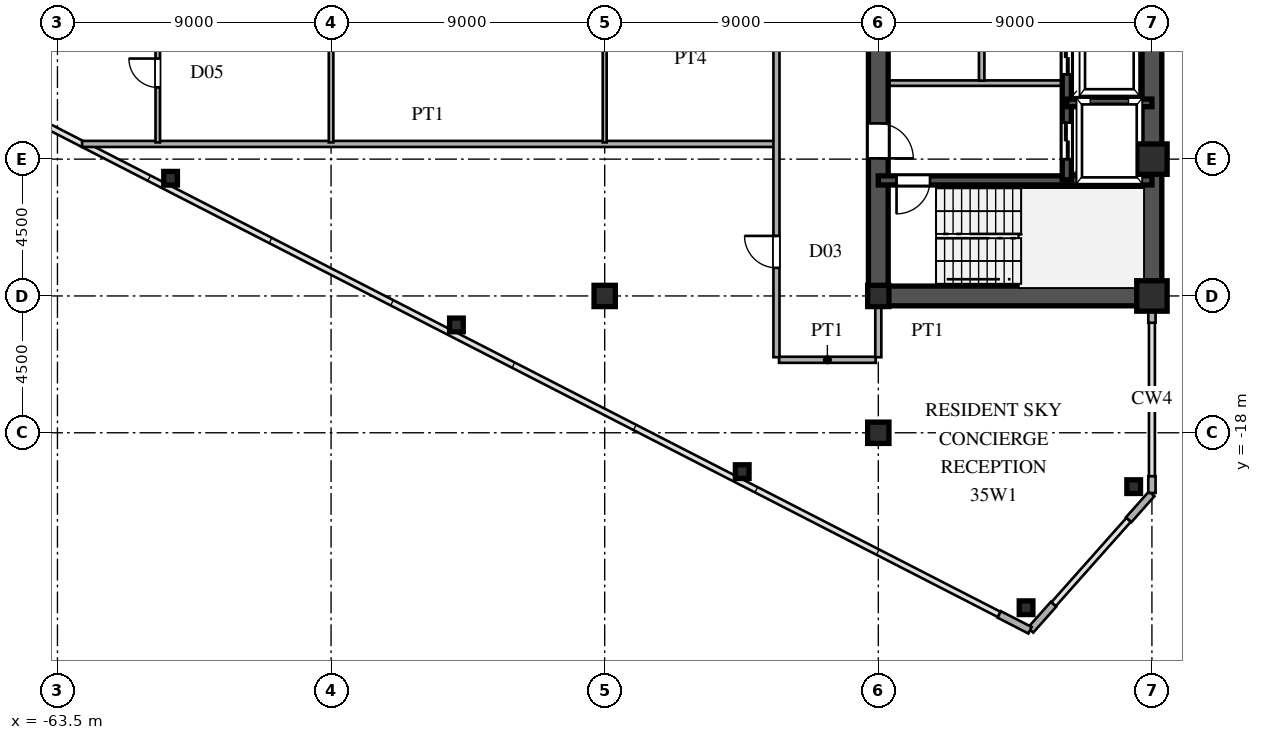
"""IFC4 building model, lengths in metres.
Left out: names, types, materials, properties, quantities, classifications, styles, units other than length and angle.
Written with IfcOpenShell. Run it as: python <this file> out.ifc"""

import sys

from ifc_helpers import new_model, si_unit, direction, frame, frame_2d, origin, origin_2d, place, context, subcontext, project, spatial, rectangle, hollow_rectangle, i_section, extrude, source, transform, mapped, element, fill, save


model = new_model("IFC4")
c1 = context("Model", 3, precision=1e-05, world=origin(), true_north=direction((0.0, 1.0)))
c2 = subcontext(c1, "Body", "Model", "MODEL_VIEW")
j1 = project(units=[si_unit("LENGTHUNIT", "METRE"), si_unit("PLANEANGLEUNIT", "RADIAN")], contexts=[c1])
p1 = place(None, origin())
s1 = spatial("IfcSite", under=j1, at=p1, CompositionType="ELEMENT")
p2 = place(p1, origin())
s2 = spatial("IfcBuilding", under=s1, at=p2, CompositionType="ELEMENT")
p3 = place(p2, frame((0.0, 0.0, 132.0)))
s3 = spatial("IfcBuildingStorey", under=s2, at=p3, CompositionType="ELEMENT", Elevation=132.0)
m1 = source(origin(), c2, "Body", "SweptSolid", [
    extrude(hollow_rectangle(XDim=1.0, YDim=1.0, WallThickness=0.042, at=origin_2d()), origin(), (0.0, 0.0, 1.0), 3.6),
])
for number, where, z_axis, x_axis in (
    (1, (-27.5, -13.5, 0.0), (0.0, 0.0, 1.0), (1.0, 0.0, 0.0)),
    (2, (-27.5, -9.0, 0.0), (0.0, 0.0, 1.0), (1.0, 0.0, 0.0)),
):
    element("IfcColumn", number, at=place(p3, frame(where, z_axis=z_axis, x_axis=x_axis)), inside=s3, PredefinedType="COLUMN", context=c2, shape_type="MappedRepresentation", body=[
        mapped(m1, transform((0.0, 0.0, 0.0), scale=1.0)),
    ])
m2 = source(origin(), c2, "Body", "SweptSolid", [
    extrude(i_section(OverallWidth=0.7, OverallDepth=0.7, WebThickness=0.028, FlangeThickness=0.045, at=origin_2d()), origin(), (0.0, 0.0, 1.0), 3.6),
])
for number, where, z_axis, x_axis in (
    (3, (-36.5, -18.0, 0.0), (0.0, 0.0, 1.0), (1.0, 0.0, 0.0)),
    (4, (-36.5, -13.5, 0.0), (0.0, 0.0, 1.0), (1.0, 0.0, 0.0)),
    (5, (-45.5, -13.5, 0.0), (0.0, 0.0, 1.0), (1.0, 0.0, 0.0)),
):
    element("IfcColumn", number, at=place(p3, frame(where, z_axis=z_axis, x_axis=x_axis)), inside=s3, PredefinedType="COLUMN", context=c2, shape_type="MappedRepresentation", body=[
        mapped(m2, transform((0.0, 0.0, 0.0), scale=1.0)),
    ])
m3 = source(origin(), c2, "Body", "SweptSolid", [
    extrude(hollow_rectangle(XDim=0.45, YDim=0.45, WallThickness=0.018, at=origin_2d()), origin(), (0.0, 0.0, 1.0), 3.6),
])
for number, where, z_axis, x_axis in (
    (6, (-28.1, -19.772, 0.0), (0.0, 0.0, 1.0), (1.0, 0.0, 0.0)),
    (7, (-31.64, -23.754, 0.0), (0.0, 0.0, 1.0), (1.0, 0.0, 0.0)),
    (8, (-40.976, -19.278, 0.0), (0.0, 0.0, 1.0), (1.0, 0.0, 0.0)),
    (9, (-50.377, -14.453, 0.0), (0.0, 0.0, 1.0), (1.0, 0.0, 0.0)),
    (10, (-59.779, -9.629, 0.0), (0.0, 0.0, 1.0), (1.0, 0.0, 0.0)),
):
    element("IfcColumn", number, at=place(p3, frame(where, z_axis=z_axis, x_axis=x_axis)), inside=s3, PredefinedType="COLUMN", context=c2, shape_type="MappedRepresentation", body=[
        mapped(m3, transform((0.0, 0.0, 0.0), scale=1.0)),
    ])
p4 = place(p3, frame((-27.5, -19.98, 0.0), z_axis=(0.0, 0.0, 1.0), x_axis=(0.0, 1.0, 0.0)))
e11 = element("IfcWall", 11, at=p4, inside=s3, PredefinedType="SOLIDWALL", context=c2, shape_type="SweptSolid", body=[
    extrude(rectangle(XDim=0.55, YDim=0.24, at=frame_2d((0.275, 0.0))), origin(), (0.0, 0.0, 1.0), 3.34),
])
p5 = place(p3, frame((-27.5, -14.38, 0.0), z_axis=(0.0, 0.0, 1.0), x_axis=(0.0, 1.0, 0.0)))
e12 = element("IfcWall", 12, at=p5, inside=s3, PredefinedType="SOLIDWALL", context=c2, shape_type="SweptSolid", body=[
    extrude(rectangle(XDim=0.55, YDim=0.24, at=frame_2d((0.275, 0.0))), origin(), (0.0, 0.0, 1.0), 2.79),
])
p6 = place(p3, frame((-32.523, -23.975, 0.0), z_axis=(0.0, 0.0, 1.0), x_axis=(0.889797395748, -0.456355776255, 0.0)))
e13 = element("IfcWall", 13, at=p6, inside=s3, PredefinedType="SOLIDWALL", context=c2, shape_type="SweptSolid", body=[
    extrude(rectangle(XDim=1.14, YDim=0.24, at=frame_2d((0.57, 0.0))), origin(), (0.0, 0.0, 1.0), 3.34),
])
for number, where, z_axis, x_axis in (
    (14, (-31.493, -24.492, 0.0), (0.0, 0.0, 1.0), (0.664, 0.747, 0.0)),
    (15, (-28.264, -20.86, 0.0), (0.0, 0.0, 1.0), (0.664, 0.747, 0.0)),
):
    element("IfcWall", number, at=place(p3, frame(where, z_axis=z_axis, x_axis=x_axis)), inside=s3, PredefinedType="SOLIDWALL", context=c2, shape_type="SweptSolid", body=[
        extrude(rectangle(XDim=1.14, YDim=0.24, at=frame_2d((0.57, 0.0))), origin(), (0.0, 0.0, 1.0), 3.34),
    ])
p7 = place(p3, frame((-27.5, -13.5, 0.0), z_axis=(0.0, 0.0, 1.0), x_axis=(0.0, 1.0, 0.0)))
e16 = element("IfcWall", 16, at=p7, inside=s3, PredefinedType="SHEAR", context=c2, shape_type="SweptSolid", body=[
    extrude(rectangle(XDim=12.2, YDim=0.65, at=frame_2d((6.1, 0.0))), origin(), (0.0, 0.0, 1.0), 3.34),
])
p8 = place(p3, frame((-36.5, -13.5, 0.0), z_axis=(0.0, 0.0, 1.0), x_axis=(1.0, 0.0, 0.0)))
e17 = element("IfcWall", 17, at=p8, inside=s3, PredefinedType="SHEAR", context=c2, shape_type="SweptSolid", body=[
    extrude(rectangle(XDim=9.0, YDim=0.65, at=frame_2d((4.5, 0.0))), origin(), (0.0, 0.0, 1.0), 3.34),
])
p9 = place(p3, frame((-36.5, -13.65, 0.0), z_axis=(0.0, 0.0, 1.0), x_axis=(0.0, 1.0, 0.0)))
e18 = element("IfcWall", 18, at=p9, inside=s3, PredefinedType="SHEAR", context=c2, shape_type="SweptSolid", body=[
    extrude(rectangle(XDim=7.15, YDim=0.65, at=frame_2d((3.575, 0.0))), origin(), (0.0, 0.0, 1.0), 3.34),
])
p10 = place(p9, frame((4.675, 0.0, 0.0)))
e19 = element("IfcOpeningElement", 19, at=p10, cuts=e18, PredefinedType="OPENING", context=c2, shape_type="SweptSolid", body=[
    extrude(rectangle(XDim=1.15, YDim=2.2, at=frame_2d((0.575, 1.1))), frame((0.0, 0.335, 0.0), z_axis=(0.0, -1.0, 0.0), x_axis=(1.0, 0.0, 0.0)), (0.0, 0.0, 1.0), 0.67),
])
p11 = place(p3, frame((-36.5, -6.5, 0.0), z_axis=(0.0, 0.0, 1.0), x_axis=(0.0, 1.0, 0.0)))
e20 = element("IfcWall", 20, at=p11, inside=s3, PredefinedType="SHEAR", context=c2, shape_type="SweptSolid", body=[
    extrude(rectangle(XDim=5.2, YDim=0.65, at=frame_2d((2.6, 0.0))), origin(), (0.0, 0.0, 1.0), 3.34),
])
p12 = place(p11, frame((2.125, 0.0, 0.0)))
e21 = element("IfcOpeningElement", 21, at=p12, cuts=e20, PredefinedType="OPENING", context=c2, shape_type="SweptSolid", body=[
    extrude(rectangle(XDim=0.95, YDim=2.15, at=frame_2d((0.475, 1.075))), frame((0.0, 0.335, 0.0), z_axis=(0.0, -1.0, 0.0), x_axis=(1.0, 0.0, 0.0)), (0.0, 0.0, 1.0), 0.67),
])
p13 = place(p3, frame((-36.5, -9.7, 0.0), z_axis=(0.0, 0.0, 1.0), x_axis=(1.0, 0.0, 0.0)))
e22 = element("IfcWall", 22, at=p13, inside=s3, PredefinedType="SHEAR", context=c2, shape_type="SweptSolid", body=[
    extrude(rectangle(XDim=9.0, YDim=0.3, at=frame_2d((4.5, 0.0))), origin(), (0.0, 0.0, 1.0), 3.34),
])
p14 = place(p13, frame((0.6, 0.0, 0.0)))
e23 = element("IfcOpeningElement", 23, at=p14, cuts=e22, PredefinedType="OPENING", context=c2, shape_type="SweptSolid", body=[
    extrude(rectangle(XDim=1.1, YDim=2.2, at=frame_2d((0.55, 1.1))), frame((0.0, 0.16, 0.0), z_axis=(0.0, -1.0, 0.0), x_axis=(1.0, 0.0, 0.0)), (0.0, 0.0, 1.0), 0.32),
])
p15 = place(p3, frame((-30.3, -7.15, 0.0), z_axis=(0.0, 0.0, 1.0), x_axis=(1.0, 0.0, 0.0)))
e24 = element("IfcWall", 24, at=p15, inside=s3, PredefinedType="SHEAR", context=c2, shape_type="SweptSolid", body=[
    extrude(rectangle(XDim=2.8, YDim=0.25, at=frame_2d((1.4, 0.0))), origin(), (0.0, 0.0, 1.0), 3.34),
])
p16 = place(p3, frame((-30.3, -9.68, 0.0), z_axis=(0.0, 0.0, 1.0), x_axis=(0.0, 1.0, 0.0)))
e25 = element("IfcWall", 25, at=p16, inside=s3, PredefinedType="SHEAR", context=c2, shape_type="SweptSolid", body=[
    extrude(rectangle(XDim=2.56, YDim=0.3, at=frame_2d((1.28, 0.0))), origin(), (0.0, 0.0, 1.0), 3.34),
])
p17 = place(p16, frame((0.68, 0.0, 0.0)))
e26 = element("IfcOpeningElement", 26, at=p17, cuts=e25, PredefinedType="OPENING", context=c2, shape_type="SweptSolid", body=[
    extrude(rectangle(XDim=1.2, YDim=2.25, at=frame_2d((0.6, 1.125))), frame((0.0, 0.16, 0.0), z_axis=(0.0, -1.0, 0.0), x_axis=(1.0, 0.0, 0.0)), (0.0, 0.0, 1.0), 0.32),
])
p18 = place(p3, frame((-30.3, -7.12, 0.0), z_axis=(0.0, 0.0, 1.0), x_axis=(0.0, 1.0, 0.0)))
e27 = element("IfcWall", 27, at=p18, inside=s3, PredefinedType="SHEAR", context=c2, shape_type="SweptSolid", body=[
    extrude(rectangle(XDim=2.92, YDim=0.3, at=frame_2d((1.46, 0.0))), origin(), (0.0, 0.0, 1.0), 3.34),
])
p19 = place(p18, frame((0.91, 0.0, 0.0)))
e28 = element("IfcOpeningElement", 28, at=p19, cuts=e27, PredefinedType="OPENING", context=c2, shape_type="SweptSolid", body=[
    extrude(rectangle(XDim=1.1, YDim=2.2, at=frame_2d((0.55, 1.1))), frame((0.0, 0.16, 0.0), z_axis=(0.0, -1.0, 0.0), x_axis=(1.0, 0.0, 0.0)), (0.0, 0.0, 1.0), 0.32),
])
p20 = place(p3, frame((-36.15, -6.5, 0.0), z_axis=(0.0, 0.0, 1.0), x_axis=(1.0, 0.0, 0.0)))
e29 = element("IfcWall", 29, at=p20, inside=s3, PredefinedType="PARTITIONING", context=c2, shape_type="SweptSolid", body=[
    extrude(rectangle(XDim=5.7, YDim=0.18, at=frame_2d((2.85, 0.0))), origin(), (0.0, 0.0, 1.0), 3.34),
])
p21 = place(p3, frame((-33.1, -6.42, 0.0), z_axis=(0.0, 0.0, 1.0), x_axis=(0.0, 1.0, 0.0)))
e30 = element("IfcWall", 30, at=p21, inside=s3, PredefinedType="PARTITIONING", context=c2, shape_type="SweptSolid", body=[
    extrude(rectangle(XDim=5.04, YDim=0.18, at=frame_2d((2.52, 0.0))), origin(), (0.0, 0.0, 1.0), 3.34),
])
p22 = place(p3, frame((-39.765, -15.6, 0.0), z_axis=(0.0, 0.0, 1.0), x_axis=(1.0, 0.0, 0.0)))
e31 = element("IfcWall", 31, at=p22, inside=s3, PredefinedType="PARTITIONING", context=c2, shape_type="SweptSolid", body=[
    extrude(rectangle(XDim=3.18, YDim=0.2, at=frame_2d((1.59, 0.0))), origin(), (0.0, 0.0, 1.0), 3.34),
])
p23 = place(p3, frame((-62.69, -8.5, 0.0), z_axis=(0.0, 0.0, 1.0), x_axis=(1.0, 0.0, 0.0)))
e32 = element("IfcWall", 32, at=p23, inside=s3, PredefinedType="PARTITIONING", context=c2, shape_type="SweptSolid", body=[
    extrude(rectangle(XDim=22.76, YDim=0.2, at=frame_2d((11.38, 0.0))), origin(), (0.0, 0.0, 1.0), 3.34),
])
p24 = place(p3, frame((-60.2, -8.45, 0.0), z_axis=(0.0, 0.0, 1.0), x_axis=(0.0, 1.0, 0.0)))
e33 = element("IfcWall", 33, at=p24, inside=s3, PredefinedType="PARTITIONING", context=c2, shape_type="SweptSolid", body=[
    extrude(rectangle(XDim=13.9, YDim=0.15, at=frame_2d((6.95, 0.0))), origin(), (0.0, 0.0, 1.0), 3.34),
])
p25 = place(p24, frame((1.808, 0.0, 0.0)))
e34 = element("IfcOpeningElement", 34, at=p25, cuts=e33, PredefinedType="OPENING", context=c2, shape_type="SweptSolid", body=[
    extrude(rectangle(XDim=0.95, YDim=2.15, at=frame_2d((0.475, 1.075))), frame((0.0, 0.085, 0.0), z_axis=(0.0, -1.0, 0.0), x_axis=(1.0, 0.0, 0.0)), (0.0, 0.0, 1.0), 0.17),
])
p26 = place(p24, frame((6.475, 0.0, 0.0)))
e35 = element("IfcOpeningElement", 35, at=p26, cuts=e33, PredefinedType="OPENING", context=c2, shape_type="SweptSolid", body=[
    extrude(rectangle(XDim=0.95, YDim=2.15, at=frame_2d((0.475, 1.075))), frame((0.0, 0.085, 0.0), z_axis=(0.0, -1.0, 0.0), x_axis=(1.0, 0.0, 0.0)), (0.0, 0.0, 1.0), 0.17),
])
p27 = place(p24, frame((11.142, 0.0, 0.0)))
e36 = element("IfcOpeningElement", 36, at=p27, cuts=e33, PredefinedType="OPENING", context=c2, shape_type="SweptSolid", body=[
    extrude(rectangle(XDim=0.95, YDim=2.15, at=frame_2d((0.475, 1.075))), frame((0.0, 0.085, 0.0), z_axis=(0.0, -1.0, 0.0), x_axis=(1.0, 0.0, 0.0)), (0.0, 0.0, 1.0), 0.17),
])
p28 = place(p3, frame((-54.5, -8.45, 0.0), z_axis=(0.0, 0.0, 1.0), x_axis=(0.0, 1.0, 0.0)))
e37 = element("IfcWall", 37, at=p28, inside=s3, PredefinedType="PARTITIONING", context=c2, shape_type="SweptSolid", body=[
    extrude(rectangle(XDim=3.93, YDim=0.15, at=frame_2d((1.965, 0.0))), origin(), (0.0, 0.0, 1.0), 3.34),
])
p29 = place(p3, frame((-45.5, -8.45, 0.0), z_axis=(0.0, 0.0, 1.0), x_axis=(0.0, 1.0, 0.0)))
e38 = element("IfcWall", 38, at=p29, inside=s3, PredefinedType="PARTITIONING", context=c2, shape_type="SweptSolid", body=[
    extrude(rectangle(XDim=9.233, YDim=0.13, at=frame_2d((4.616, 0.0))), origin(), (0.0, 0.0, 1.0), 2.44),
])
p30 = place(p29, frame((6.475, 0.0, 0.0)))
e39 = element("IfcOpeningElement", 39, at=p30, cuts=e38, PredefinedType="OPENING", context=c2, shape_type="SweptSolid", body=[
    extrude(rectangle(XDim=0.95, YDim=2.15, at=frame_2d((0.475, 1.075))), frame((0.0, 0.075, 0.0), z_axis=(0.0, -1.0, 0.0), x_axis=(1.0, 0.0, 0.0)), (0.0, 0.0, 1.0), 0.15),
])
p31 = place(p3, frame((-39.85, -15.515, 0.0), z_axis=(0.0, 0.0, 1.0), x_axis=(0.0, 1.0, 0.0)))
e40 = element("IfcWall", 40, at=p31, inside=s3, PredefinedType="PARTITIONING", context=c2, shape_type="SweptSolid", body=[
    extrude(rectangle(XDim=31.03, YDim=0.2, at=frame_2d((15.515, 0.0))), origin(), (0.0, 0.0, 1.0), 3.34),
])
p32 = place(p31, frame((2.94, 0.0, 0.0)))
e41 = element("IfcOpeningElement", 41, at=p32, cuts=e40, PredefinedType="OPENING", context=c2, shape_type="SweptSolid", body=[
    extrude(rectangle(XDim=1.05, YDim=2.25, at=frame_2d((0.525, 1.125))), frame((0.0, 0.11, 0.0), z_axis=(0.0, -1.0, 0.0), x_axis=(1.0, 0.0, 0.0)), (0.0, 0.0, 1.0), 0.22),
])
p33 = place(p31, frame((13.28, 0.0, 0.0)))
e42 = element("IfcOpeningElement", 42, at=p33, cuts=e40, PredefinedType="OPENING", context=c2, shape_type="SweptSolid", body=[
    extrude(rectangle(XDim=1.05, YDim=2.25, at=frame_2d((0.525, 1.125))), frame((0.0, 0.11, 0.0), z_axis=(0.0, -1.0, 0.0), x_axis=(1.0, 0.0, 0.0)), (0.0, 0.0, 1.0), 0.22),
])
p34 = place(p31, frame((25.54, 0.0, 0.0)))
e43 = element("IfcOpeningElement", 43, at=p34, cuts=e40, PredefinedType="OPENING", context=c2, shape_type="SweptSolid", body=[
    extrude(rectangle(XDim=1.05, YDim=2.25, at=frame_2d((0.525, 1.125))), frame((0.0, 0.11, 0.0), z_axis=(0.0, -1.0, 0.0), x_axis=(1.0, 0.0, 0.0)), (0.0, 0.0, 1.0), 0.22),
])
p35 = place(p3, frame((-36.5, -15.515, 0.0), z_axis=(0.0, 0.0, 1.0), x_axis=(0.0, 1.0, 0.0)))
e44 = element("IfcWall", 44, at=p35, inside=s3, PredefinedType="PARTITIONING", context=c2, shape_type="SweptSolid", body=[
    extrude(rectangle(XDim=1.685, YDim=0.2, at=frame_2d((0.842, 0.0))), origin(), (0.0, 0.0, 1.0), 2.44),
])
m4 = source(origin(), c2, "Body", "SweptSolid", [
    extrude(rectangle(XDim=1.15, YDim=2.2, at=frame_2d((0.575, 1.1))), frame((0.0, 0.025, 0.0), z_axis=(0.0, -1.0, 0.0), x_axis=(1.0, 0.0, 0.0)), (0.0, 0.0, 1.0), 0.05),
])
p36 = place(p10, frame((1.15, 0.0, 0.0), z_axis=(0.0, 0.0, 1.0), x_axis=(-1.0, 0.0, 0.0)))
e45 = element("IfcDoor", 45, at=p36, inside=s3, OperationType="SINGLE_SWING_LEFT", PredefinedType="DOOR", context=c2, shape_type="MappedRepresentation", body=[
    mapped(m4, transform((0.0, 0.0, 0.0), scale=1.0)),
])
fill(e19, e45)
m5 = source(origin(), c2, "Body", "SweptSolid", [
    extrude(rectangle(XDim=1.1, YDim=2.2, at=frame_2d((0.55, 1.1))), frame((0.0, 0.025, 0.0), z_axis=(0.0, -1.0, 0.0), x_axis=(1.0, 0.0, 0.0)), (0.0, 0.0, 1.0), 0.05),
])
p37 = place(p14, frame((1.1, 0.0, 0.0), z_axis=(0.0, 0.0, 1.0), x_axis=(-1.0, 0.0, 0.0)))
e46 = element("IfcDoor", 46, at=p37, inside=s3, OperationType="SINGLE_SWING_LEFT", PredefinedType="DOOR", context=c2, shape_type="MappedRepresentation", body=[
    mapped(m5, transform((0.0, 0.0, 0.0), scale=1.0)),
])
fill(e23, e46)
m6 = source(origin(), c2, "Body", "SweptSolid", [
    extrude(rectangle(XDim=1.2, YDim=2.25, at=frame_2d((0.6, 1.125))), frame((0.0, 0.025, 0.0), z_axis=(0.0, -1.0, 0.0), x_axis=(1.0, 0.0, 0.0)), (0.0, 0.0, 1.0), 0.05),
])
p38 = place(p17, origin())
e47 = element("IfcDoor", 47, at=p38, inside=s3, OperationType="DOUBLE_DOOR_SLIDING", PredefinedType="DOOR", context=c2, shape_type="MappedRepresentation", body=[
    mapped(m6, transform((0.0, 0.0, 0.0), scale=1.0)),
])
fill(e26, e47)
m7 = source(origin(), c2, "Body", "SweptSolid", [
    extrude(rectangle(XDim=1.1, YDim=2.2, at=frame_2d((0.55, 1.1))), frame((0.0, 0.025, 0.0), z_axis=(0.0, -1.0, 0.0), x_axis=(1.0, 0.0, 0.0)), (0.0, 0.0, 1.0), 0.05),
])
p39 = place(p19, origin())
e48 = element("IfcDoor", 48, at=p39, inside=s3, OperationType="DOUBLE_DOOR_SLIDING", PredefinedType="DOOR", context=c2, shape_type="MappedRepresentation", body=[
    mapped(m7, transform((0.0, 0.0, 0.0), scale=1.0)),
])
fill(e28, e48)
m8 = source(origin(), c2, "Body", "SweptSolid", [
    extrude(rectangle(XDim=0.95, YDim=2.15, at=frame_2d((0.475, 1.075))), frame((0.0, 0.025, 0.0), z_axis=(0.0, -1.0, 0.0), x_axis=(1.0, 0.0, 0.0)), (0.0, 0.0, 1.0), 0.05),
])
p40 = place(p25, origin())
e49 = element("IfcDoor", 49, at=p40, inside=s3, OperationType="SINGLE_SWING_RIGHT", PredefinedType="DOOR", context=c2, shape_type="MappedRepresentation", body=[
    mapped(m8, transform((0.0, 0.0, 0.0), scale=1.0)),
])
fill(e34, e49)
m9 = source(origin(), c2, "Body", "SweptSolid", [
    extrude(rectangle(XDim=1.05, YDim=2.25, at=frame_2d((0.525, 1.125))), frame((0.0, 0.025, 0.0), z_axis=(0.0, -1.0, 0.0), x_axis=(1.0, 0.0, 0.0)), (0.0, 0.0, 1.0), 0.05),
])
p41 = place(p32, origin())
e50 = element("IfcDoor", 50, at=p41, inside=s3, OperationType="SINGLE_SWING_RIGHT", PredefinedType="DOOR", context=c2, shape_type="MappedRepresentation", body=[
    mapped(m9, transform((0.0, 0.0, 0.0), scale=1.0)),
])
fill(e41, e50)
save(model, sys.argv[1])
